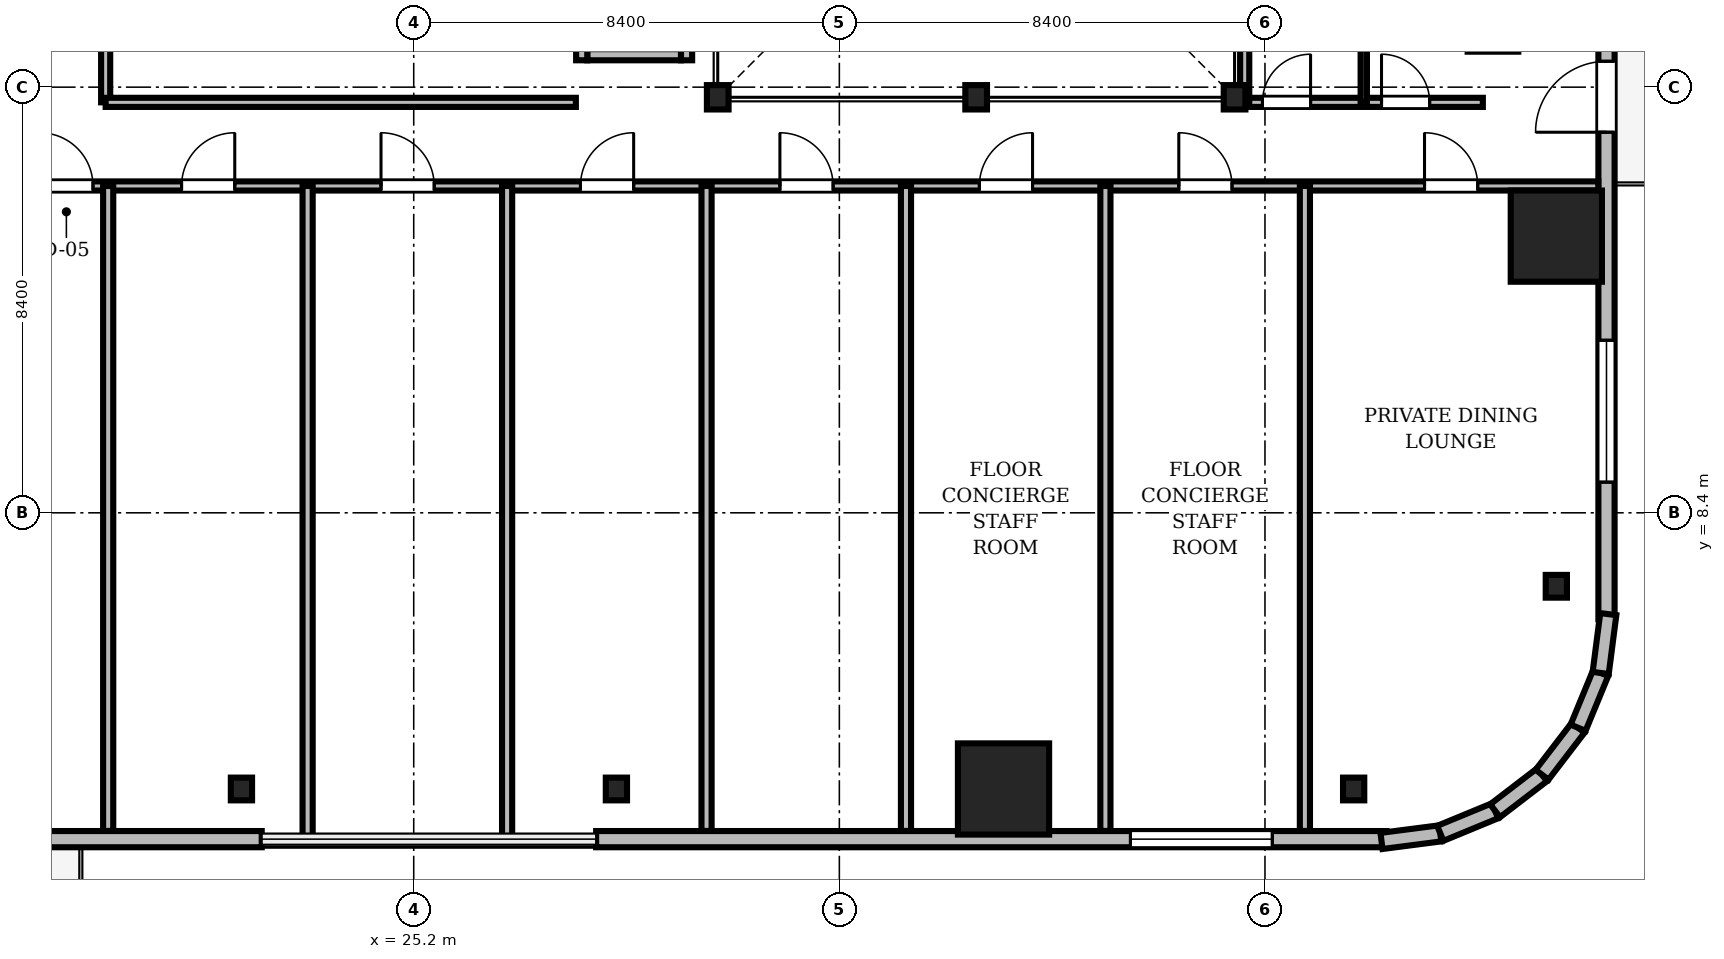
"""IFC4 building model, lengths in metres.
Left out: names, types, materials, properties, quantities, classifications, styles, units other than length and angle.
Written with IfcOpenShell. Run it as: python <this file> out.ifc"""

import sys

from ifc_helpers import new_model, si_unit, direction, frame, frame_2d, origin, origin_2d, place, context, subcontext, project, spatial, rectangle, i_section, extrude, source, transform, mapped, element, fill, save


model = new_model("IFC4")
c1 = context("Model", 3, precision=1e-05, world=origin(), true_north=direction((0.0, 1.0)))
c2 = subcontext(c1, "Body", "Model", "MODEL_VIEW")
j1 = project(units=[si_unit("LENGTHUNIT", "METRE"), si_unit("PLANEANGLEUNIT", "RADIAN")], contexts=[c1])
p1 = place(None, origin())
s1 = spatial("IfcSite", under=j1, at=p1, CompositionType="ELEMENT")
p2 = place(p1, origin())
s2 = spatial("IfcBuilding", under=s1, at=p2, CompositionType="ELEMENT")
p3 = place(p2, frame((0.0, 0.0, 56.8)))
s3 = spatial("IfcBuildingStorey", under=s2, at=p3, CompositionType="ELEMENT", Elevation=56.8)
m1 = source(origin(), c2, "Body", "SweptSolid", [
    extrude(i_section(OverallWidth=0.428, OverallDepth=0.481, WebThickness=0.04, FlangeThickness=0.063, FilletRadius=0.015, at=origin_2d()), origin(), (0.0, 0.0, 1.0), 3.41),
])
for number, where, z_axis, x_axis in (
    (1, (31.2, 16.6, 0.0), (0.0, 0.0, 1.0), (1.0, 0.0, 0.0)),
    (2, (36.3, 16.6, 0.0), (0.0, 0.0, 1.0), (1.0, 0.0, 0.0)),
    (3, (41.4, 16.6, 0.0), (0.0, 0.0, 1.0), (1.0, 0.0, 0.0)),
):
    element("IfcColumn", number, at=place(p3, frame(where, z_axis=z_axis, x_axis=x_axis)), inside=s3, PredefinedType="COLUMN", context=c2, shape_type="MappedRepresentation", body=[
        mapped(m1, transform((0.0, 0.0, 0.0), scale=1.0)),
    ])
m2 = source(origin(), c2, "Body", "SweptSolid", [
    extrude(rectangle(XDim=1.8, YDim=1.8, at=origin_2d()), origin(), (0.0, 0.0, 1.0), 3.41),
])
for number, where, z_axis, x_axis in (
    (4, (36.84, 2.95, 0.0), (0.0, 0.0, 1.0), (1.0, 0.0, 0.0)),
    (5, (47.75, 13.86, 0.0), (0.0, 0.0, 1.0), (1.0, 0.0, 0.0)),
):
    element("IfcColumn", number, at=place(p3, frame(where, z_axis=z_axis, x_axis=x_axis)), inside=s3, PredefinedType="COLUMN", context=c2, shape_type="MappedRepresentation", body=[
        mapped(m2, transform((0.0, 0.0, 0.0), scale=1.0)),
    ])
m3 = source(origin(), c2, "Body", "SweptSolid", [
    extrude(i_section(OverallWidth=0.419, OverallDepth=0.449, WebThickness=0.031, FlangeThickness=0.048, FilletRadius=0.015, at=origin_2d()), origin(), (0.0, 0.0, 1.0), 3.41),
])
for number, where, z_axis, x_axis in (
    (6, (21.8, 2.95, 0.0), (0.0, 0.0, 1.0), (1.0, 0.0, 0.0)),
    (7, (29.2, 2.95, 0.0), (0.0, 0.0, 1.0), (1.0, 0.0, 0.0)),
    (8, (43.75, 2.95, 0.0), (0.0, 0.0, 1.0), (1.0, 0.0, 0.0)),
    (9, (47.75, 6.95, 0.0), (0.0, 0.0, 1.0), (1.0, 0.0, 0.0)),
):
    element("IfcColumn", number, at=place(p3, frame(where, z_axis=z_axis, x_axis=x_axis)), inside=s3, PredefinedType="COLUMN", context=c2, shape_type="MappedRepresentation", body=[
        mapped(m3, transform((0.0, 0.0, 0.0), scale=1.0)),
    ])
m4 = source(origin(), c2, "Body", "SweptSolid", [
    extrude(rectangle(XDim=15.6, YDim=0.32, at=frame_2d((7.8, 0.0))), origin(), (0.0, 0.0, 1.0), 3.41),
])
p4 = place(p3, frame((6.6, 1.96, 0.0), z_axis=(0.0, 0.0, 1.0), x_axis=(1.0, 0.0, 0.0)))
e10 = element("IfcWall", 10, at=p4, inside=s3, PredefinedType="SOLIDWALL", context=c2, shape_type="MappedRepresentation", body=[
    mapped(m4, transform((0.0, 0.0, 0.0), scale=1.0)),
])
m5 = source(origin(), c2, "Body", "SweptSolid", [
    extrude(rectangle(XDim=1.4, YDim=2.3, at=frame_2d((0.7, 1.15))), frame((0.0, 0.17, 0.0), z_axis=(0.0, -1.0, 0.0), x_axis=(1.0, 0.0, 0.0)), (0.0, 0.0, 1.0), 0.34),
])
p5 = place(p4, frame((9.61, 0.0, 0.0)))
e11 = element("IfcOpeningElement", 11, at=p5, cuts=e10, PredefinedType="OPENING", context=c2, shape_type="MappedRepresentation", body=[
    mapped(m5, transform((0.0, 0.0, 0.0), scale=1.0)),
])
m6 = source(origin(), c2, "Body", "SweptSolid", [
    extrude(rectangle(XDim=2.8, YDim=2.4, at=frame_2d((1.4, 1.2))), frame((0.0, 0.17, 0.0), z_axis=(0.0, -1.0, 0.0), x_axis=(1.0, 0.0, 0.0)), (0.0, 0.0, 1.0), 0.34),
])
p6 = place(p4, frame((2.705, 0.0, 0.72)))
e12 = element("IfcOpeningElement", 12, at=p6, cuts=e10, PredefinedType="OPENING", context=c2, shape_type="MappedRepresentation", body=[
    mapped(m6, transform((0.0, 0.0, 0.0), scale=1.0)),
])
p7 = place(p3, frame((28.8, 1.96, 0.0), z_axis=(0.0, 0.0, 1.0), x_axis=(1.0, 0.0, 0.0)))
e13 = element("IfcWall", 13, at=p7, inside=s3, PredefinedType="SOLIDWALL", context=c2, shape_type="MappedRepresentation", body=[
    mapped(m4, transform((0.0, 0.0, 0.0), scale=1.0)),
])
p8 = place(p7, frame((10.545, 0.0, 0.72)))
e14 = element("IfcOpeningElement", 14, at=p8, cuts=e13, PredefinedType="OPENING", context=c2, shape_type="MappedRepresentation", body=[
    mapped(m6, transform((0.0, 0.0, 0.0), scale=1.0)),
])
p9 = place(p3, frame((48.74, 6.3, 0.0), z_axis=(0.0, 0.0, 1.0), x_axis=(0.0, 1.0, 0.0)))
e15 = element("IfcWall", 15, at=p9, inside=s3, PredefinedType="SOLIDWALL", context=c2, shape_type="MappedRepresentation", body=[
    mapped(m4, transform((0.0, 0.0, 0.0), scale=1.0)),
])
p10 = place(p9, frame((9.61, 0.0, 0.0)))
e16 = element("IfcOpeningElement", 16, at=p10, cuts=e15, PredefinedType="OPENING", context=c2, shape_type="MappedRepresentation", body=[
    mapped(m5, transform((0.0, 0.0, 0.0), scale=1.0)),
])
p11 = place(p9, frame((2.705, 0.0, 0.72)))
e17 = element("IfcOpeningElement", 17, at=p11, cuts=e15, PredefinedType="OPENING", context=c2, shape_type="MappedRepresentation", body=[
    mapped(m6, transform((0.0, 0.0, 0.0), scale=1.0)),
])
m7 = source(origin(), c2, "Body", "SweptSolid", [
    extrude(rectangle(XDim=1.17, YDim=0.32, at=frame_2d((0.585, 0.0))), origin(), (0.0, 0.0, 1.0), 3.41),
])
p12 = place(p3, frame((44.3, 1.925, 0.0), z_axis=(0.0, 0.0, 1.0), x_axis=(0.991762485493, 0.128090485085, 0.0)))
e18 = element("IfcWall", 18, at=p12, inside=s3, PredefinedType="SOLIDWALL", context=c2, shape_type="MappedRepresentation", body=[
    mapped(m7, transform((0.0, 0.0, 0.0), scale=1.0)),
])
m8 = source(origin(), c2, "Body", "SweptSolid", [
    extrude(rectangle(XDim=1.169, YDim=0.32, at=frame_2d((0.585, 0.0))), origin(), (0.0, 0.0, 1.0), 3.41),
])
p13 = place(p3, frame((45.46, 2.074, 0.0), z_axis=(0.0, 0.0, 1.0), x_axis=(0.924479075121, 0.381232789334, 0.0)))
e19 = element("IfcWall", 19, at=p13, inside=s3, PredefinedType="SOLIDWALL", context=c2, shape_type="MappedRepresentation", body=[
    mapped(m8, transform((0.0, 0.0, 0.0), scale=1.0)),
])
m9 = source(origin(), c2, "Body", "SweptSolid", [
    extrude(rectangle(XDim=1.169, YDim=0.32, at=frame_2d((0.584, 0.0))), origin(), (0.0, 0.0, 1.0), 3.41),
])
p14 = place(p3, frame((46.541, 2.52, 0.0), z_axis=(0.0, 0.0, 1.0), x_axis=(0.793663520347, 0.608356981114, 0.0)))
e20 = element("IfcWall", 20, at=p14, inside=s3, PredefinedType="SOLIDWALL", context=c2, shape_type="MappedRepresentation", body=[
    mapped(m9, transform((0.0, 0.0, 0.0), scale=1.0)),
])
m10 = source(origin(), c2, "Body", "SweptSolid", [
    extrude(rectangle(XDim=1.169, YDim=0.32, at=frame_2d((0.584, 0.0))), origin(), (0.0, 0.0, 1.0), 3.41),
])
for number, where, z_axis, x_axis in (
    (21, (47.469, 3.231, 0.0), (0.0, 0.0, 1.0), (0.608, 0.794, 0.0)),
    (22, (48.18, 4.159, 0.0), (0.0, 0.0, 1.0), (0.381, 0.925, 0.0)),
):
    element("IfcWall", number, at=place(p3, frame(where, z_axis=z_axis, x_axis=x_axis)), inside=s3, PredefinedType="SOLIDWALL", context=c2, shape_type="MappedRepresentation", body=[
        mapped(m10, transform((0.0, 0.0, 0.0), scale=1.0)),
    ])
m11 = source(origin(), c2, "Body", "SweptSolid", [
    extrude(rectangle(XDim=1.171, YDim=0.32, at=frame_2d((0.585, 0.0))), origin(), (0.0, 0.0, 1.0), 3.41),
])
p15 = place(p3, frame((48.625, 5.24, 0.0), z_axis=(0.0, 0.0, 1.0), x_axis=(0.128269133229, 0.991739395941, 0.0)))
e23 = element("IfcWall", 23, at=p15, inside=s3, PredefinedType="SOLIDWALL", context=c2, shape_type="MappedRepresentation", body=[
    mapped(m11, transform((0.0, 0.0, 0.0), scale=1.0)),
])
m12 = source(origin(), c2, "Body", "SweptSolid", [
    extrude(rectangle(XDim=1.85, YDim=0.22, at=frame_2d((0.925, 0.0))), origin(), (0.0, 0.0, 1.0), 3.41),
])
p16 = place(p3, frame((28.625, 17.44, 0.0), z_axis=(0.0, 0.0, 1.0), x_axis=(1.0, 0.0, 0.0)))
e24 = element("IfcWall", 24, at=p16, inside=s3, PredefinedType="SOLIDWALL", context=c2, shape_type="MappedRepresentation", body=[
    mapped(m12, transform((0.0, 0.0, 0.0), scale=1.0)),
])
m13 = source(origin(), c2, "Body", "SweptSolid", [
    extrude(rectangle(XDim=2.54, YDim=0.22, at=frame_2d((1.27, 0.0))), origin(), (0.0, 0.0, 1.0), 3.41),
])
for number, where, z_axis, x_axis in (
    (25, (28.515, 17.33, 0.0), (0.0, 0.0, 1.0), (0.0, 1.0, 0.0)),
    (26, (30.585, 17.33, 0.0), (0.0, 0.0, 1.0), (0.0, 1.0, 0.0)),
):
    element("IfcWall", number, at=place(p3, frame(where, z_axis=z_axis, x_axis=x_axis)), inside=s3, PredefinedType="SOLIDWALL", context=c2, shape_type="MappedRepresentation", body=[
        mapped(m13, transform((0.0, 0.0, 0.0), scale=1.0)),
    ])
m14 = source(origin(), c2, "Body", "SweptSolid", [
    extrude(rectangle(XDim=46.156, YDim=0.18, at=frame_2d((23.078, 0.0))), origin(), (0.0, 0.0, 1.0), 2.652),
])
p17 = place(p3, frame((2.422, 14.85, 0.0), z_axis=(0.0, 0.0, 1.0), x_axis=(1.0, 0.0, 0.0)))
e27 = element("IfcWall", 27, at=p17, inside=s3, PredefinedType="PARTITIONING", context=c2, shape_type="MappedRepresentation", body=[
    mapped(m14, transform((0.0, 0.0, 0.0), scale=1.0)),
])
m15 = source(origin(), c2, "Body", "SweptSolid", [
    extrude(rectangle(XDim=1.05, YDim=2.2, at=frame_2d((0.525, 1.1))), frame((0.0, 0.1, 0.0), z_axis=(0.0, -1.0, 0.0), x_axis=(1.0, 0.0, 0.0)), (0.0, 0.0, 1.0), 0.2),
])
p18 = place(p17, frame((15.398, 0.0, 0.0)))
e28 = element("IfcOpeningElement", 28, at=p18, cuts=e27, PredefinedType="OPENING", context=c2, shape_type="MappedRepresentation", body=[
    mapped(m15, transform((0.0, 0.0, 0.0), scale=1.0)),
])
p19 = place(p17, frame((18.196, 0.0, 0.0)))
e29 = element("IfcOpeningElement", 29, at=p19, cuts=e27, PredefinedType="OPENING", context=c2, shape_type="MappedRepresentation", body=[
    mapped(m15, transform((0.0, 0.0, 0.0), scale=1.0)),
])
p20 = place(p17, frame((22.132, 0.0, 0.0)))
e30 = element("IfcOpeningElement", 30, at=p20, cuts=e27, PredefinedType="OPENING", context=c2, shape_type="MappedRepresentation", body=[
    mapped(m15, transform((0.0, 0.0, 0.0), scale=1.0)),
])
p21 = place(p17, frame((26.069, 0.0, 0.0)))
e31 = element("IfcOpeningElement", 31, at=p21, cuts=e27, PredefinedType="OPENING", context=c2, shape_type="MappedRepresentation", body=[
    mapped(m15, transform((0.0, 0.0, 0.0), scale=1.0)),
])
p22 = place(p17, frame((30.005, 0.0, 0.0)))
e32 = element("IfcOpeningElement", 32, at=p22, cuts=e27, PredefinedType="OPENING", context=c2, shape_type="MappedRepresentation", body=[
    mapped(m15, transform((0.0, 0.0, 0.0), scale=1.0)),
])
p23 = place(p17, frame((33.941, 0.0, 0.0)))
e33 = element("IfcOpeningElement", 33, at=p23, cuts=e27, PredefinedType="OPENING", context=c2, shape_type="MappedRepresentation", body=[
    mapped(m15, transform((0.0, 0.0, 0.0), scale=1.0)),
])
p24 = place(p17, frame((37.877, 0.0, 0.0)))
e34 = element("IfcOpeningElement", 34, at=p24, cuts=e27, PredefinedType="OPENING", context=c2, shape_type="MappedRepresentation", body=[
    mapped(m15, transform((0.0, 0.0, 0.0), scale=1.0)),
])
p25 = place(p17, frame((42.727, 0.0, 0.0)))
e35 = element("IfcOpeningElement", 35, at=p25, cuts=e27, PredefinedType="OPENING", context=c2, shape_type="MappedRepresentation", body=[
    mapped(m15, transform((0.0, 0.0, 0.0), scale=1.0)),
])
m16 = source(origin(), c2, "Body", "SweptSolid", [
    extrude(rectangle(XDim=4.7, YDim=0.18, at=frame_2d((2.35, 0.0))), origin(), (0.0, 0.0, 1.0), 2.802),
])
p26 = place(p3, frame((41.6, 16.5, 0.0), z_axis=(0.0, 0.0, 1.0), x_axis=(1.0, 0.0, 0.0)))
e36 = element("IfcWall", 36, at=p26, inside=s3, PredefinedType="PARTITIONING", context=c2, shape_type="MappedRepresentation", body=[
    mapped(m16, transform((0.0, 0.0, 0.0), scale=1.0)),
])
m17 = source(origin(), c2, "Body", "SweptSolid", [
    extrude(rectangle(XDim=0.95, YDim=2.15, at=frame_2d((0.475, 1.075))), frame((0.0, 0.1, 0.0), z_axis=(0.0, -1.0, 0.0), x_axis=(1.0, 0.0, 0.0)), (0.0, 0.0, 1.0), 0.2),
])
p27 = place(p26, frame((0.35, 0.0, 0.0)))
e37 = element("IfcOpeningElement", 37, at=p27, cuts=e36, PredefinedType="OPENING", context=c2, shape_type="MappedRepresentation", body=[
    mapped(m17, transform((0.0, 0.0, 0.0), scale=1.0)),
])
p28 = place(p26, frame((2.7, 0.0, 0.0)))
e38 = element("IfcOpeningElement", 38, at=p28, cuts=e36, PredefinedType="OPENING", context=c2, shape_type="MappedRepresentation", body=[
    mapped(m17, transform((0.0, 0.0, 0.0), scale=1.0)),
])
m18 = source(origin(), c2, "Body", "SweptSolid", [
    extrude(rectangle(XDim=3.55, YDim=0.18, at=frame_2d((1.775, 0.0))), origin(), (0.0, 0.0, 1.0), 2.802),
])
p29 = place(p3, frame((19.12, 16.5, 0.0), z_axis=(0.0, 0.0, 1.0), x_axis=(0.0, 1.0, 0.0)))
e39 = element("IfcWall", 39, at=p29, inside=s3, PredefinedType="PARTITIONING", context=c2, shape_type="MappedRepresentation", body=[
    mapped(m18, transform((0.0, 0.0, 0.0), scale=1.0)),
])
p30 = place(p29, frame((1.15, 0.0, 0.0)))
e40 = element("IfcOpeningElement", 40, at=p30, cuts=e39, PredefinedType="OPENING", context=c2, shape_type="MappedRepresentation", body=[
    mapped(m15, transform((0.0, 0.0, 0.0), scale=1.0)),
])
m19 = source(origin(), c2, "Body", "SweptSolid", [
    extrude(rectangle(XDim=12.728, YDim=0.2, at=frame_2d((6.364, 0.0))), origin(), (0.0, 0.0, 1.0), 2.652),
])
p31 = place(p3, frame((19.17, 2.122, 0.0), z_axis=(0.0, 0.0, 1.0), x_axis=(0.0, 1.0, 0.0)))
e41 = element("IfcWall", 41, at=p31, inside=s3, PredefinedType="PARTITIONING", context=c2, shape_type="MappedRepresentation", body=[
    mapped(m19, transform((0.0, 0.0, 0.0), scale=1.0)),
])
m20 = source(origin(), c2, "Body", "SweptSolid", [
    extrude(rectangle(XDim=12.92, YDim=0.2, at=frame_2d((6.46, 0.0))), origin(), (0.0, 0.0, 1.0), 2.652),
])
for number, where, z_axis, x_axis in (
    (42, (23.106, 1.93, 0.0), (0.0, 0.0, 1.0), (0.0, 1.0, 0.0)),
    (43, (27.043, 1.93, 0.0), (0.0, 0.0, 1.0), (0.0, 1.0, 0.0)),
):
    element("IfcWall", number, at=place(p3, frame(where, z_axis=z_axis, x_axis=x_axis)), inside=s3, PredefinedType="PARTITIONING", context=c2, shape_type="MappedRepresentation", body=[
        mapped(m20, transform((0.0, 0.0, 0.0), scale=1.0)),
    ])
for number, where, z_axis, x_axis in (
    (44, (30.979, 2.122, 0.0), (0.0, 0.0, 1.0), (0.0, 1.0, 0.0)),
    (45, (34.915, 2.122, 0.0), (0.0, 0.0, 1.0), (0.0, 1.0, 0.0)),
    (46, (38.851, 2.122, 0.0), (0.0, 0.0, 1.0), (0.0, 1.0, 0.0)),
    (47, (42.788, 2.122, 0.0), (0.0, 0.0, 1.0), (0.0, 1.0, 0.0)),
):
    element("IfcWall", number, at=place(p3, frame(where, z_axis=z_axis, x_axis=x_axis)), inside=s3, PredefinedType="PARTITIONING", context=c2, shape_type="MappedRepresentation", body=[
        mapped(m19, transform((0.0, 0.0, 0.0), scale=1.0)),
    ])
m21 = source(origin(), c2, "Body", "SweptSolid", [
    extrude(rectangle(XDim=9.28, YDim=0.18, at=frame_2d((4.64, 0.0))), origin(), (0.0, 0.0, 1.0), 2.802),
])
p32 = place(p3, frame((19.12, 16.5, 0.0), z_axis=(0.0, 0.0, 1.0), x_axis=(1.0, 0.0, 0.0)))
e48 = element("IfcWall", 48, at=p32, inside=s3, PredefinedType="PARTITIONING", context=c2, shape_type="MappedRepresentation", body=[
    mapped(m21, transform((0.0, 0.0, 0.0), scale=1.0)),
])
m22 = source(origin(), c2, "Body", "SweptSolid", [
    extrude(rectangle(XDim=7.15, YDim=0.18, at=frame_2d((3.575, 0.0))), origin(), (0.0, 0.0, 1.0), 2.802),
])
p33 = place(p3, frame((41.6, 16.5, 0.0), z_axis=(0.0, 0.0, 1.0), x_axis=(0.0, 1.0, 0.0)))
e49 = element("IfcWall", 49, at=p33, inside=s3, PredefinedType="PARTITIONING", context=c2, shape_type="MappedRepresentation", body=[
    mapped(m22, transform((0.0, 0.0, 0.0), scale=1.0)),
])
m23 = source(origin(), c2, "Body", "SweptSolid", [
    extrude(rectangle(XDim=7.15, YDim=0.125, at=frame_2d((3.575, 0.0))), origin(), (0.0, 0.0, 1.0), 2.802),
])
p34 = place(p3, frame((43.95, 16.5, 0.0), z_axis=(0.0, 0.0, 1.0), x_axis=(0.0, 1.0, 0.0)))
e50 = element("IfcWall", 50, at=p34, inside=s3, PredefinedType="PARTITIONING", context=c2, shape_type="MappedRepresentation", body=[
    mapped(m23, transform((0.0, 0.0, 0.0), scale=1.0)),
])
m24 = source(origin(), c2, "Body", "SweptSolid", [
    extrude(rectangle(XDim=2.8, YDim=2.4, at=frame_2d((1.4, 1.2))), frame((0.0, 0.03, 0.0), z_axis=(0.0, -1.0, 0.0), x_axis=(1.0, 0.0, 0.0)), (0.0, 0.0, 1.0), 0.06),
])
p35 = place(p8, origin())
e51 = element("IfcWindow", 51, at=p35, inside=s3, PartitioningType="SINGLE_PANEL", PredefinedType="WINDOW", context=c2, shape_type="MappedRepresentation", body=[
    mapped(m24, transform((0.0, 0.0, 0.0), scale=1.0)),
])
fill(e14, e51)
m25 = source(origin(), c2, "Body", "SweptSolid", [
    extrude(rectangle(XDim=1.4, YDim=2.3, at=frame_2d((0.7, 1.15))), frame((0.0, 0.025, 0.0), z_axis=(0.0, -1.0, 0.0), x_axis=(1.0, 0.0, 0.0)), (0.0, 0.0, 1.0), 0.05),
])
p36 = place(p10, frame((1.4, 0.0, 0.0), z_axis=(0.0, 0.0, 1.0), x_axis=(-1.0, 0.0, 0.0)))
e52 = element("IfcDoor", 52, at=p36, inside=s3, OperationType="DOUBLE_DOOR_SLIDING", PredefinedType="DOOR", context=c2, shape_type="MappedRepresentation", body=[
    mapped(m25, transform((0.0, 0.0, 0.0), scale=1.0)),
])
fill(e16, e52)
p37 = place(p11, origin())
e53 = element("IfcWindow", 53, at=p37, inside=s3, PartitioningType="SINGLE_PANEL", PredefinedType="WINDOW", context=c2, shape_type="MappedRepresentation", body=[
    mapped(m24, transform((0.0, 0.0, 0.0), scale=1.0)),
])
fill(e17, e53)
m26 = source(origin(), c2, "Body", "SweptSolid", [
    extrude(rectangle(XDim=1.05, YDim=2.2, at=frame_2d((0.525, 1.1))), frame((0.0, 0.025, 0.0), z_axis=(0.0, -1.0, 0.0), x_axis=(1.0, 0.0, 0.0)), (0.0, 0.0, 1.0), 0.05),
])
p38 = place(p18, origin())
e54 = element("IfcDoor", 54, at=p38, inside=s3, OperationType="SINGLE_SWING_LEFT", PredefinedType="DOOR", context=c2, shape_type="MappedRepresentation", body=[
    mapped(m26, transform((0.0, 0.0, 0.0), scale=1.0)),
])
fill(e28, e54)
p39 = place(p19, origin())
e55 = element("IfcDoor", 55, at=p39, inside=s3, OperationType="SINGLE_SWING_RIGHT", PredefinedType="DOOR", context=c2, shape_type="MappedRepresentation", body=[
    mapped(m26, transform((0.0, 0.0, 0.0), scale=1.0)),
])
fill(e29, e55)
p40 = place(p20, origin())
e56 = element("IfcDoor", 56, at=p40, inside=s3, OperationType="SINGLE_SWING_LEFT", PredefinedType="DOOR", context=c2, shape_type="MappedRepresentation", body=[
    mapped(m26, transform((0.0, 0.0, 0.0), scale=1.0)),
])
fill(e30, e56)
p41 = place(p21, origin())
e57 = element("IfcDoor", 57, at=p41, inside=s3, OperationType="SINGLE_SWING_RIGHT", PredefinedType="DOOR", context=c2, shape_type="MappedRepresentation", body=[
    mapped(m26, transform((0.0, 0.0, 0.0), scale=1.0)),
])
fill(e31, e57)
p42 = place(p22, origin())
e58 = element("IfcDoor", 58, at=p42, inside=s3, OperationType="SINGLE_SWING_LEFT", PredefinedType="DOOR", context=c2, shape_type="MappedRepresentation", body=[
    mapped(m26, transform((0.0, 0.0, 0.0), scale=1.0)),
])
fill(e32, e58)
p43 = place(p23, origin())
e59 = element("IfcDoor", 59, at=p43, inside=s3, OperationType="SINGLE_SWING_RIGHT", PredefinedType="DOOR", context=c2, shape_type="MappedRepresentation", body=[
    mapped(m26, transform((0.0, 0.0, 0.0), scale=1.0)),
])
fill(e33, e59)
p44 = place(p24, origin())
e60 = element("IfcDoor", 60, at=p44, inside=s3, OperationType="SINGLE_SWING_LEFT", PredefinedType="DOOR", context=c2, shape_type="MappedRepresentation", body=[
    mapped(m26, transform((0.0, 0.0, 0.0), scale=1.0)),
])
fill(e34, e60)
p45 = place(p25, origin())
e61 = element("IfcDoor", 61, at=p45, inside=s3, OperationType="SINGLE_SWING_LEFT", PredefinedType="DOOR", context=c2, shape_type="MappedRepresentation", body=[
    mapped(m26, transform((0.0, 0.0, 0.0), scale=1.0)),
])
fill(e35, e61)
m27 = source(origin(), c2, "Body", "SweptSolid", [
    extrude(rectangle(XDim=0.95, YDim=2.15, at=frame_2d((0.475, 1.075))), frame((0.0, 0.025, 0.0), z_axis=(0.0, -1.0, 0.0), x_axis=(1.0, 0.0, 0.0)), (0.0, 0.0, 1.0), 0.05),
])
p46 = place(p27, origin())
e62 = element("IfcDoor", 62, at=p46, inside=s3, OperationType="SINGLE_SWING_RIGHT", PredefinedType="DOOR", context=c2, shape_type="MappedRepresentation", body=[
    mapped(m27, transform((0.0, 0.0, 0.0), scale=1.0)),
])
fill(e37, e62)
p47 = place(p28, origin())
e63 = element("IfcDoor", 63, at=p47, inside=s3, OperationType="SINGLE_SWING_LEFT", PredefinedType="DOOR", context=c2, shape_type="MappedRepresentation", body=[
    mapped(m27, transform((0.0, 0.0, 0.0), scale=1.0)),
])
fill(e38, e63)
save(model, sys.argv[1])
